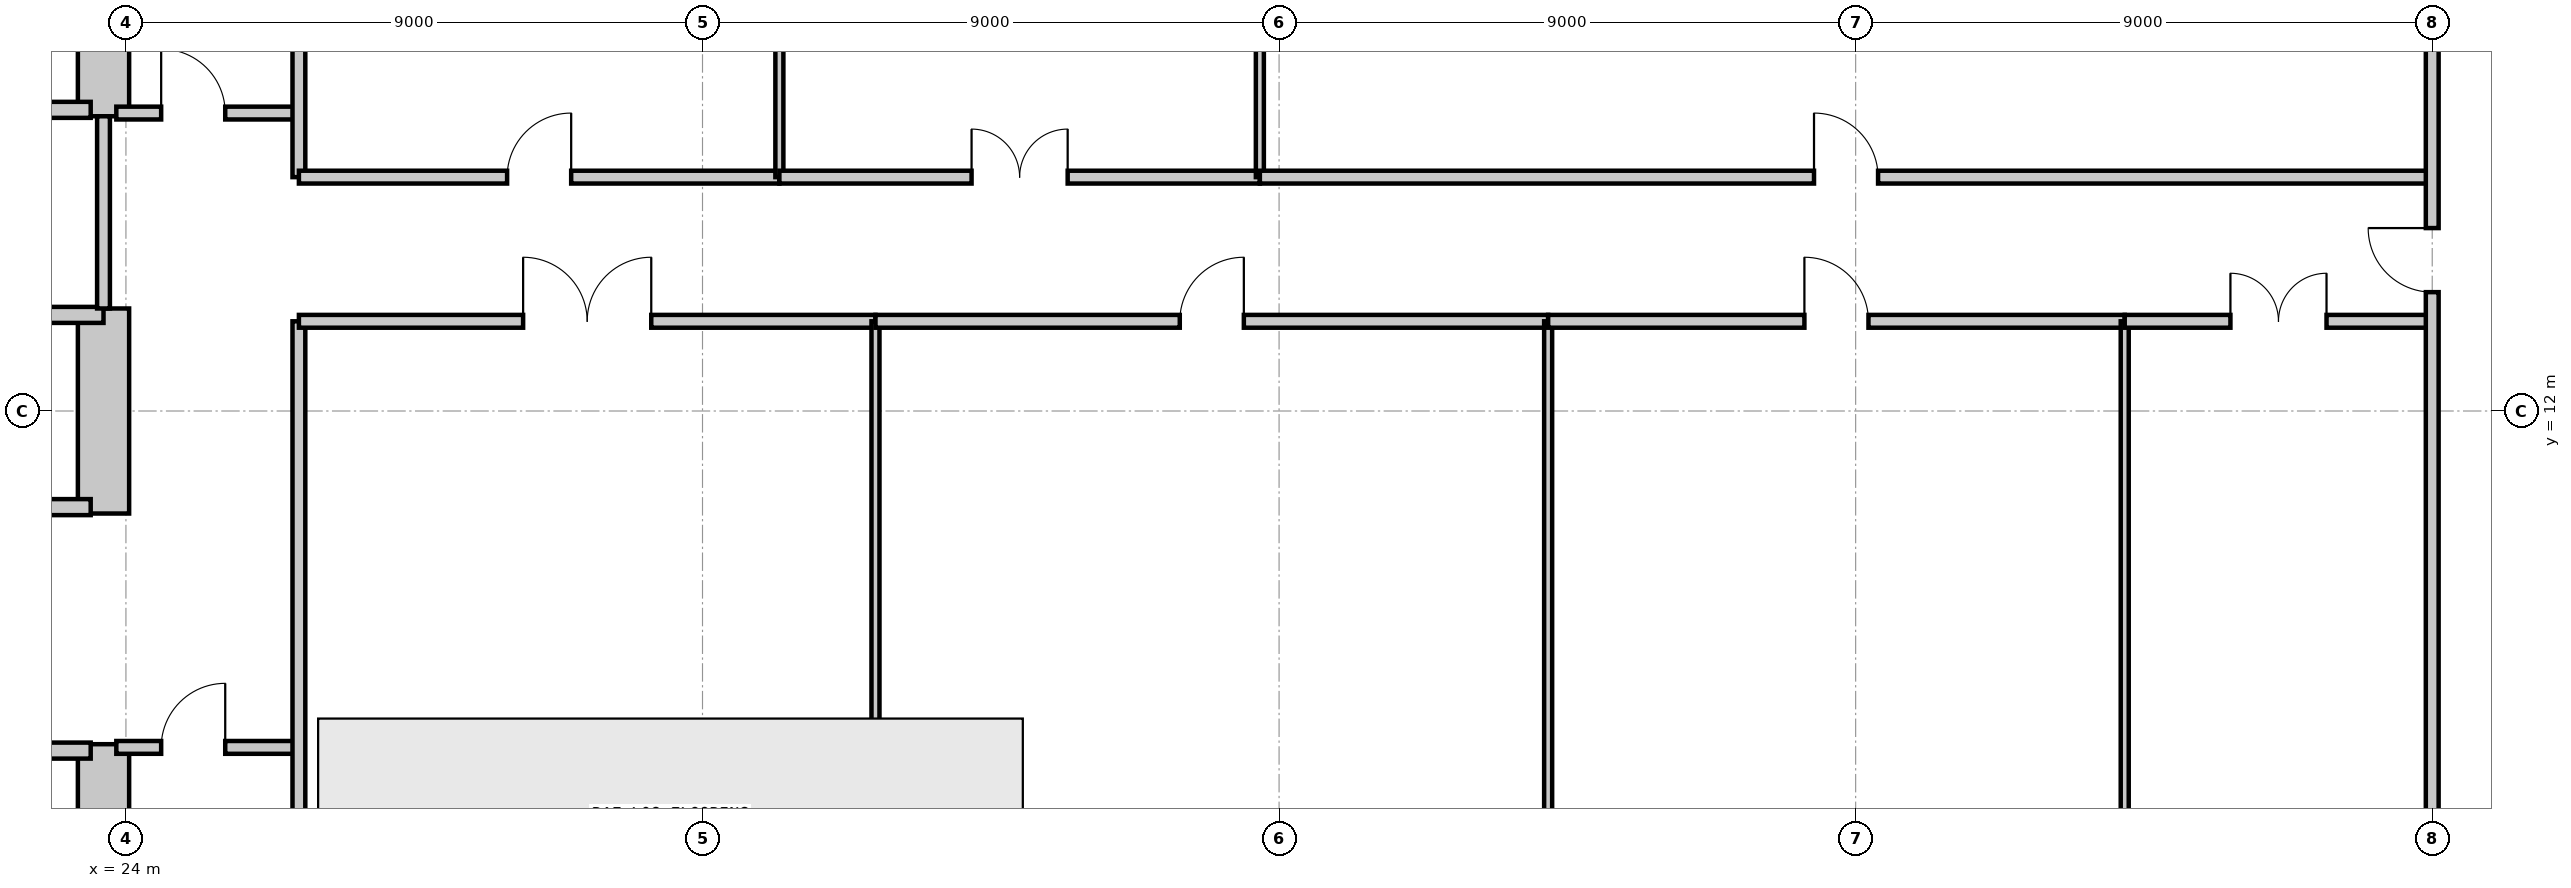
"""IFC4 building model, lengths in metres.
Left out: names, types, materials, properties, quantities, classifications, styles, units other than length and angle.
Written with IfcOpenShell. Run it as: python <this file> out.ifc"""

import sys

from ifc_helpers import new_model, si_unit, direction, frame, frame_2d, origin, place, context, subcontext, project, spatial, rectangle, extrude, element, fill, save


model = new_model("IFC4")
c1 = context("Model", 3, precision=1e-05, world=origin(), true_north=direction((0.0, 1.0)))
c2 = subcontext(c1, "Body", "Model", "MODEL_VIEW")
j1 = project(units=[si_unit("LENGTHUNIT", "METRE"), si_unit("PLANEANGLEUNIT", "RADIAN")], contexts=[c1])
p1 = place(None, origin())
s1 = spatial("IfcSite", under=j1, at=p1, CompositionType="ELEMENT")
p2 = place(p1, origin())
s2 = spatial("IfcBuilding", under=s1, at=p2, CompositionType="ELEMENT")
p3 = place(p2, frame((0.0, 0.0, 38.4)))
s3 = spatial("IfcBuildingStorey", under=s2, at=p3, CompositionType="ELEMENT", Elevation=38.4)
p4 = place(p3, frame((23.65, 3.75, 0.0), z_axis=(0.0, 0.0, 1.0), x_axis=(0.0, 1.0, 0.0)))
e1 = element("IfcWall", 1, at=p4, inside=s3, PredefinedType="SHEAR", context=c2, shape_type="SweptSolid", body=[
    extrude(rectangle(XDim=3.05, YDim=0.8, at=frame_2d((1.525, 0.0))), origin(), (0.0, 0.0, 1.0), 4.2),
])
p5 = place(p3, frame((23.65, 10.4, 0.0), z_axis=(0.0, 0.0, 1.0), x_axis=(0.0, 1.0, 0.0)))
e2 = element("IfcWall", 2, at=p5, inside=s3, PredefinedType="SHEAR", context=c2, shape_type="SweptSolid", body=[
    extrude(rectangle(XDim=3.2, YDim=0.8, at=frame_2d((1.6, 0.0))), origin(), (0.0, 0.0, 1.0), 4.2),
])
p6 = place(p3, frame((23.65, 16.6, 0.0), z_axis=(0.0, 0.0, 1.0), x_axis=(0.0, 1.0, 0.0)))
e3 = element("IfcWall", 3, at=p6, inside=s3, PredefinedType="SHEAR", context=c2, shape_type="SweptSolid", body=[
    extrude(rectangle(XDim=4.05, YDim=0.8, at=frame_2d((2.025, 0.0))), origin(), (0.0, 0.0, 1.0), 4.2),
])
p7 = place(p3, frame((21.05, 16.7, 0.0), z_axis=(0.0, 0.0, 1.0), x_axis=(1.0, 0.0, 0.0)))
e4 = element("IfcWall", 4, at=p7, inside=s3, PredefinedType="PARTITIONING", context=c2, shape_type="SweptSolid", body=[
    extrude(rectangle(XDim=2.4, YDim=0.25, at=frame_2d((1.2, 0.0))), origin(), (0.0, 0.0, 1.0), 3.426),
])
p8 = place(p3, frame((21.05, 6.7, 0.0), z_axis=(0.0, 0.0, 1.0), x_axis=(1.0, 0.0, 0.0)))
e5 = element("IfcWall", 5, at=p8, inside=s3, PredefinedType="PARTITIONING", context=c2, shape_type="SweptSolid", body=[
    extrude(rectangle(XDim=2.4, YDim=0.25, at=frame_2d((1.2, 0.0))), origin(), (0.0, 0.0, 1.0), 3.426),
])
p9 = place(p8, frame((0.48, 0.0, 0.0)))
e6 = element("IfcOpeningElement", 6, at=p9, cuts=e5, PredefinedType="OPENING", context=c2, shape_type="SweptSolid", body=[
    extrude(rectangle(XDim=1.15, YDim=2.25, at=frame_2d((0.575, 1.125))), frame((0.0, 0.135, 0.0), z_axis=(0.0, -1.0, 0.0), x_axis=(1.0, 0.0, 0.0)), (0.0, 0.0, 1.0), 0.27),
])
p10 = place(p3, frame((21.05, 10.5, 0.0), z_axis=(0.0, 0.0, 1.0), x_axis=(1.0, 0.0, 0.0)))
e7 = element("IfcWall", 7, at=p10, inside=s3, PredefinedType="PARTITIONING", context=c2, shape_type="SweptSolid", body=[
    extrude(rectangle(XDim=2.4, YDim=0.25, at=frame_2d((1.2, 0.0))), origin(), (0.0, 0.0, 1.0), 3.426),
])
p11 = place(p3, frame((14.7, 13.5, 0.0), z_axis=(0.0, 0.0, 1.0), x_axis=(1.0, 0.0, 0.0)))
e8 = element("IfcWall", 8, at=p11, inside=s3, PredefinedType="PARTITIONING", context=c2, shape_type="SweptSolid", body=[
    extrude(rectangle(XDim=8.95, YDim=0.25, at=frame_2d((4.475, 0.0))), origin(), (0.0, 0.0, 1.0), 3.426),
])
p12 = place(p3, frame((23.65, 13.6, 0.0), z_axis=(0.0, 0.0, 1.0), x_axis=(0.0, 1.0, 0.0)))
e9 = element("IfcWall", 9, at=p12, inside=s3, PredefinedType="PARTITIONING", context=c2, shape_type="SweptSolid", body=[
    extrude(rectangle(XDim=3.0, YDim=0.2, at=frame_2d((1.5, 0.0))), origin(), (0.0, 0.0, 1.0), 3.97),
])
p13 = place(p3, frame((23.85, 6.75, 0.0), z_axis=(0.0, 0.0, 1.0), x_axis=(1.0, 0.0, 0.0)))
e10 = element("IfcWall", 10, at=p13, inside=s3, PredefinedType="PARTITIONING", context=c2, shape_type="SweptSolid", body=[
    extrude(rectangle(XDim=2.85, YDim=0.2, at=frame_2d((1.425, 0.0))), origin(), (0.0, 0.0, 1.0), 3.97),
])
p14 = place(p13, frame((0.7, 0.0, 0.0)))
e11 = element("IfcOpeningElement", 11, at=p14, cuts=e10, PredefinedType="OPENING", context=c2, shape_type="SweptSolid", body=[
    extrude(rectangle(XDim=1.0, YDim=2.15, at=frame_2d((0.5, 1.075))), frame((0.0, 0.11, 0.0), z_axis=(0.0, -1.0, 0.0), x_axis=(1.0, 0.0, 0.0)), (0.0, 0.0, 1.0), 0.22),
])
p15 = place(p3, frame((23.85, 16.65, 0.0), z_axis=(0.0, 0.0, 1.0), x_axis=(1.0, 0.0, 0.0)))
e12 = element("IfcWall", 12, at=p15, inside=s3, PredefinedType="PARTITIONING", context=c2, shape_type="SweptSolid", body=[
    extrude(rectangle(XDim=2.85, YDim=0.2, at=frame_2d((1.425, 0.0))), origin(), (0.0, 0.0, 1.0), 3.97),
])
p16 = place(p15, frame((0.7, 0.0, 0.0)))
e13 = element("IfcOpeningElement", 13, at=p16, cuts=e12, PredefinedType="OPENING", context=c2, shape_type="SweptSolid", body=[
    extrude(rectangle(XDim=1.0, YDim=2.15, at=frame_2d((0.5, 1.075))), frame((0.0, 0.11, 0.0), z_axis=(0.0, -1.0, 0.0), x_axis=(1.0, 0.0, 0.0)), (0.0, 0.0, 1.0), 0.22),
])
p17 = place(p3, frame((26.7, 3.18, 0.0), z_axis=(0.0, 0.0, 1.0), x_axis=(0.0, 1.0, 0.0)))
e14 = element("IfcWall", 14, at=p17, inside=s3, PredefinedType="PARTITIONING", context=c2, shape_type="SweptSolid", body=[
    extrude(rectangle(XDim=10.22, YDim=0.2, at=frame_2d((5.11, 0.0))), origin(), (0.0, 0.0, 1.0), 3.97),
])
p18 = place(p3, frame((26.7, 15.65, 0.0), z_axis=(0.0, 0.0, 1.0), x_axis=(0.0, 1.0, 0.0)))
e15 = element("IfcWall", 15, at=p18, inside=s3, PredefinedType="PARTITIONING", context=c2, shape_type="SweptSolid", body=[
    extrude(rectangle(XDim=5.17, YDim=0.2, at=frame_2d((2.585, 0.0))), origin(), (0.0, 0.0, 1.0), 3.97),
])
p19 = place(p3, frame((26.7, 13.4, 0.0), z_axis=(0.0, 0.0, 1.0), x_axis=(1.0, 0.0, 0.0)))
e16 = element("IfcWall", 16, at=p19, inside=s3, PredefinedType="PARTITIONING", context=c2, shape_type="SweptSolid", body=[
    extrude(rectangle(XDim=9.0, YDim=0.2, at=frame_2d((4.5, 0.0))), origin(), (0.0, 0.0, 1.0), 3.97),
])
p20 = place(p19, frame((3.5, 0.0, 0.0)))
e17 = element("IfcOpeningElement", 17, at=p20, cuts=e16, PredefinedType="OPENING", context=c2, shape_type="SweptSolid", body=[
    extrude(rectangle(XDim=2.0, YDim=2.5, at=frame_2d((1.0, 1.25))), frame((0.0, 0.11, 0.0), z_axis=(0.0, -1.0, 0.0), x_axis=(1.0, 0.0, 0.0)), (0.0, 0.0, 1.0), 0.22),
])
p21 = place(p3, frame((35.7, 3.18, 0.0), z_axis=(0.0, 0.0, 1.0), x_axis=(0.0, 1.0, 0.0)))
e18 = element("IfcWall", 18, at=p21, inside=s3, PredefinedType="PARTITIONING", context=c2, shape_type="SweptSolid", body=[
    extrude(rectangle(XDim=10.22, YDim=0.125, at=frame_2d((5.11, 0.0))), origin(), (0.0, 0.0, 1.0), 3.97),
])
p22 = place(p3, frame((35.7, 13.4, 0.0), z_axis=(0.0, 0.0, 1.0), x_axis=(1.0, 0.0, 0.0)))
e19 = element("IfcWall", 19, at=p22, inside=s3, PredefinedType="PARTITIONING", context=c2, shape_type="SweptSolid", body=[
    extrude(rectangle(XDim=10.5, YDim=0.2, at=frame_2d((5.25, 0.0))), origin(), (0.0, 0.0, 1.0), 3.97),
])
p23 = place(p22, frame((4.75, 0.0, 0.0)))
e20 = element("IfcOpeningElement", 20, at=p23, cuts=e19, PredefinedType="OPENING", context=c2, shape_type="SweptSolid", body=[
    extrude(rectangle(XDim=1.0, YDim=2.15, at=frame_2d((0.5, 1.075))), frame((0.0, 0.11, 0.0), z_axis=(0.0, -1.0, 0.0), x_axis=(1.0, 0.0, 0.0)), (0.0, 0.0, 1.0), 0.22),
])
p24 = place(p3, frame((46.2, 3.18, 0.0), z_axis=(0.0, 0.0, 1.0), x_axis=(0.0, 1.0, 0.0)))
e21 = element("IfcWall", 21, at=p24, inside=s3, PredefinedType="PARTITIONING", context=c2, shape_type="SweptSolid", body=[
    extrude(rectangle(XDim=10.22, YDim=0.125, at=frame_2d((5.11, 0.0))), origin(), (0.0, 0.0, 1.0), 3.97),
])
p25 = place(p3, frame((46.2, 13.4, 0.0), z_axis=(0.0, 0.0, 1.0), x_axis=(1.0, 0.0, 0.0)))
e22 = element("IfcWall", 22, at=p25, inside=s3, PredefinedType="PARTITIONING", context=c2, shape_type="SweptSolid", body=[
    extrude(rectangle(XDim=9.0, YDim=0.2, at=frame_2d((4.5, 0.0))), origin(), (0.0, 0.0, 1.0), 3.97),
])
p26 = place(p25, frame((4.0, 0.0, 0.0)))
e23 = element("IfcOpeningElement", 23, at=p26, cuts=e22, PredefinedType="OPENING", context=c2, shape_type="SweptSolid", body=[
    extrude(rectangle(XDim=1.0, YDim=2.15, at=frame_2d((0.5, 1.075))), frame((0.0, 0.11, 0.0), z_axis=(0.0, -1.0, 0.0), x_axis=(1.0, 0.0, 0.0)), (0.0, 0.0, 1.0), 0.22),
])
p27 = place(p3, frame((55.2, 3.18, 0.0), z_axis=(0.0, 0.0, 1.0), x_axis=(0.0, 1.0, 0.0)))
e24 = element("IfcWall", 24, at=p27, inside=s3, PredefinedType="PARTITIONING", context=c2, shape_type="SweptSolid", body=[
    extrude(rectangle(XDim=10.22, YDim=0.125, at=frame_2d((5.11, 0.0))), origin(), (0.0, 0.0, 1.0), 3.97),
])
p28 = place(p3, frame((55.2, 13.4, 0.0), z_axis=(0.0, 0.0, 1.0), x_axis=(1.0, 0.0, 0.0)))
e25 = element("IfcWall", 25, at=p28, inside=s3, PredefinedType="PARTITIONING", context=c2, shape_type="SweptSolid", body=[
    extrude(rectangle(XDim=4.8, YDim=0.2, at=frame_2d((2.4, 0.0))), origin(), (0.0, 0.0, 1.0), 3.97),
])
p29 = place(p28, frame((1.65, 0.0, 0.0)))
e26 = element("IfcOpeningElement", 26, at=p29, cuts=e25, PredefinedType="OPENING", context=c2, shape_type="SweptSolid", body=[
    extrude(rectangle(XDim=1.5, YDim=2.3, at=frame_2d((0.75, 1.15))), frame((0.0, 0.11, 0.0), z_axis=(0.0, -1.0, 0.0), x_axis=(1.0, 0.0, 0.0)), (0.0, 0.0, 1.0), 0.22),
])
p30 = place(p3, frame((26.7, 15.65, 0.0), z_axis=(0.0, 0.0, 1.0), x_axis=(1.0, 0.0, 0.0)))
e27 = element("IfcWall", 27, at=p30, inside=s3, PredefinedType="PARTITIONING", context=c2, shape_type="SweptSolid", body=[
    extrude(rectangle(XDim=7.5, YDim=0.2, at=frame_2d((3.75, 0.0))), origin(), (0.0, 0.0, 1.0), 3.97),
])
p31 = place(p30, frame((3.25, 0.0, 0.0)))
e28 = element("IfcOpeningElement", 28, at=p31, cuts=e27, PredefinedType="OPENING", context=c2, shape_type="SweptSolid", body=[
    extrude(rectangle(XDim=1.0, YDim=2.15, at=frame_2d((0.5, 1.075))), frame((0.0, 0.11, 0.0), z_axis=(0.0, -1.0, 0.0), x_axis=(1.0, 0.0, 0.0)), (0.0, 0.0, 1.0), 0.22),
])
p32 = place(p3, frame((34.2, 15.65, 0.0), z_axis=(0.0, 0.0, 1.0), x_axis=(0.0, 1.0, 0.0)))
e29 = element("IfcWall", 29, at=p32, inside=s3, PredefinedType="PARTITIONING", context=c2, shape_type="SweptSolid", body=[
    extrude(rectangle(XDim=5.17, YDim=0.125, at=frame_2d((2.585, 0.0))), origin(), (0.0, 0.0, 1.0), 3.97),
])
p33 = place(p3, frame((34.2, 15.65, 0.0), z_axis=(0.0, 0.0, 1.0), x_axis=(1.0, 0.0, 0.0)))
e30 = element("IfcWall", 30, at=p33, inside=s3, PredefinedType="PARTITIONING", context=c2, shape_type="SweptSolid", body=[
    extrude(rectangle(XDim=7.5, YDim=0.2, at=frame_2d((3.75, 0.0))), origin(), (0.0, 0.0, 1.0), 3.97),
])
p34 = place(p33, frame((3.0, 0.0, 0.0)))
e31 = element("IfcOpeningElement", 31, at=p34, cuts=e30, PredefinedType="OPENING", context=c2, shape_type="SweptSolid", body=[
    extrude(rectangle(XDim=1.5, YDim=2.3, at=frame_2d((0.75, 1.15))), frame((0.0, 0.11, 0.0), z_axis=(0.0, -1.0, 0.0), x_axis=(1.0, 0.0, 0.0)), (0.0, 0.0, 1.0), 0.22),
])
p35 = place(p3, frame((41.7, 15.65, 0.0), z_axis=(0.0, 0.0, 1.0), x_axis=(0.0, 1.0, 0.0)))
e32 = element("IfcWall", 32, at=p35, inside=s3, PredefinedType="PARTITIONING", context=c2, shape_type="SweptSolid", body=[
    extrude(rectangle(XDim=5.17, YDim=0.125, at=frame_2d((2.585, 0.0))), origin(), (0.0, 0.0, 1.0), 3.97),
])
p36 = place(p3, frame((41.7, 15.65, 0.0), z_axis=(0.0, 0.0, 1.0), x_axis=(1.0, 0.0, 0.0)))
e33 = element("IfcWall", 33, at=p36, inside=s3, PredefinedType="PARTITIONING", context=c2, shape_type="SweptSolid", body=[
    extrude(rectangle(XDim=18.3, YDim=0.2, at=frame_2d((9.15, 0.0))), origin(), (0.0, 0.0, 1.0), 3.97),
])
p37 = place(p36, frame((8.65, 0.0, 0.0)))
e34 = element("IfcOpeningElement", 34, at=p37, cuts=e33, PredefinedType="OPENING", context=c2, shape_type="SweptSolid", body=[
    extrude(rectangle(XDim=1.0, YDim=2.15, at=frame_2d((0.5, 1.075))), frame((0.0, 0.11, 0.0), z_axis=(0.0, -1.0, 0.0), x_axis=(1.0, 0.0, 0.0)), (0.0, 0.0, 1.0), 0.22),
])
p38 = place(p3, frame((60.0, 3.18, 0.0), z_axis=(0.0, 0.0, 1.0), x_axis=(0.0, 1.0, 0.0)))
e35 = element("IfcWall", 35, at=p38, inside=s3, PredefinedType="PARTITIONING", context=c2, shape_type="SweptSolid", body=[
    extrude(rectangle(XDim=17.64, YDim=0.2, at=frame_2d((8.82, 0.0))), origin(), (0.0, 0.0, 1.0), 3.97),
])
p39 = place(p38, frame((10.675, 0.0, 0.0)))
e36 = element("IfcOpeningElement", 36, at=p39, cuts=e35, PredefinedType="OPENING", context=c2, shape_type="SweptSolid", body=[
    extrude(rectangle(XDim=1.0, YDim=2.15, at=frame_2d((0.5, 1.075))), frame((0.0, 0.11, 0.0), z_axis=(0.0, -1.0, 0.0), x_axis=(1.0, 0.0, 0.0)), (0.0, 0.0, 1.0), 0.22),
])
p40 = place(p14, origin())
e37 = element("IfcDoor", 37, at=p40, inside=s3, OperationType="SINGLE_SWING_RIGHT", PredefinedType="DOOR", context=c2, shape_type="SweptSolid", body=[
    extrude(rectangle(XDim=1.0, YDim=2.15, at=frame_2d((0.5, 1.075))), frame((0.0, 0.025, 0.0), z_axis=(0.0, -1.0, 0.0), x_axis=(1.0, 0.0, 0.0)), (0.0, 0.0, 1.0), 0.05),
])
fill(e11, e37)
p41 = place(p16, origin())
e38 = element("IfcDoor", 38, at=p41, inside=s3, OperationType="SINGLE_SWING_LEFT", PredefinedType="DOOR", context=c2, shape_type="SweptSolid", body=[
    extrude(rectangle(XDim=1.0, YDim=2.15, at=frame_2d((0.5, 1.075))), frame((0.0, 0.025, 0.0), z_axis=(0.0, -1.0, 0.0), x_axis=(1.0, 0.0, 0.0)), (0.0, 0.0, 1.0), 0.05),
])
fill(e13, e38)
p42 = place(p20, origin())
e39 = element("IfcDoor", 39, at=p42, inside=s3, OperationType="DOUBLE_DOOR_SINGLE_SWING", PredefinedType="DOOR", context=c2, shape_type="SweptSolid", body=[
    extrude(rectangle(XDim=2.0, YDim=2.5, at=frame_2d((1.0, 1.25))), frame((0.0, 0.025, 0.0), z_axis=(0.0, -1.0, 0.0), x_axis=(1.0, 0.0, 0.0)), (0.0, 0.0, 1.0), 0.05),
])
fill(e17, e39)
p43 = place(p23, origin())
e40 = element("IfcDoor", 40, at=p43, inside=s3, OperationType="SINGLE_SWING_RIGHT", PredefinedType="DOOR", context=c2, shape_type="SweptSolid", body=[
    extrude(rectangle(XDim=1.0, YDim=2.15, at=frame_2d((0.5, 1.075))), frame((0.0, 0.025, 0.0), z_axis=(0.0, -1.0, 0.0), x_axis=(1.0, 0.0, 0.0)), (0.0, 0.0, 1.0), 0.05),
])
fill(e20, e40)
p44 = place(p26, origin())
e41 = element("IfcDoor", 41, at=p44, inside=s3, OperationType="SINGLE_SWING_LEFT", PredefinedType="DOOR", context=c2, shape_type="SweptSolid", body=[
    extrude(rectangle(XDim=1.0, YDim=2.15, at=frame_2d((0.5, 1.075))), frame((0.0, 0.025, 0.0), z_axis=(0.0, -1.0, 0.0), x_axis=(1.0, 0.0, 0.0)), (0.0, 0.0, 1.0), 0.05),
])
fill(e23, e41)
p45 = place(p29, origin())
e42 = element("IfcDoor", 42, at=p45, inside=s3, OperationType="DOUBLE_DOOR_SINGLE_SWING", PredefinedType="DOOR", context=c2, shape_type="SweptSolid", body=[
    extrude(rectangle(XDim=1.5, YDim=2.3, at=frame_2d((0.75, 1.15))), frame((0.0, 0.025, 0.0), z_axis=(0.0, -1.0, 0.0), x_axis=(1.0, 0.0, 0.0)), (0.0, 0.0, 1.0), 0.05),
])
fill(e26, e42)
p46 = place(p31, origin())
e43 = element("IfcDoor", 43, at=p46, inside=s3, OperationType="SINGLE_SWING_RIGHT", PredefinedType="DOOR", context=c2, shape_type="SweptSolid", body=[
    extrude(rectangle(XDim=1.0, YDim=2.15, at=frame_2d((0.5, 1.075))), frame((0.0, 0.025, 0.0), z_axis=(0.0, -1.0, 0.0), x_axis=(1.0, 0.0, 0.0)), (0.0, 0.0, 1.0), 0.05),
])
fill(e28, e43)
p47 = place(p34, origin())
e44 = element("IfcDoor", 44, at=p47, inside=s3, OperationType="DOUBLE_DOOR_SINGLE_SWING", PredefinedType="DOOR", context=c2, shape_type="SweptSolid", body=[
    extrude(rectangle(XDim=1.5, YDim=2.3, at=frame_2d((0.75, 1.15))), frame((0.0, 0.025, 0.0), z_axis=(0.0, -1.0, 0.0), x_axis=(1.0, 0.0, 0.0)), (0.0, 0.0, 1.0), 0.05),
])
fill(e31, e44)
p48 = place(p37, origin())
e45 = element("IfcDoor", 45, at=p48, inside=s3, OperationType="SINGLE_SWING_LEFT", PredefinedType="DOOR", context=c2, shape_type="SweptSolid", body=[
    extrude(rectangle(XDim=1.0, YDim=2.15, at=frame_2d((0.5, 1.075))), frame((0.0, 0.025, 0.0), z_axis=(0.0, -1.0, 0.0), x_axis=(1.0, 0.0, 0.0)), (0.0, 0.0, 1.0), 0.05),
])
fill(e34, e45)
p49 = place(p39, origin())
e46 = element("IfcDoor", 46, at=p49, inside=s3, OperationType="SINGLE_SWING_RIGHT", PredefinedType="DOOR", context=c2, shape_type="SweptSolid", body=[
    extrude(rectangle(XDim=1.0, YDim=2.15, at=frame_2d((0.5, 1.075))), frame((0.0, 0.025, 0.0), z_axis=(0.0, -1.0, 0.0), x_axis=(1.0, 0.0, 0.0)), (0.0, 0.0, 1.0), 0.05),
])
fill(e36, e46)
save(model, sys.argv[1])
